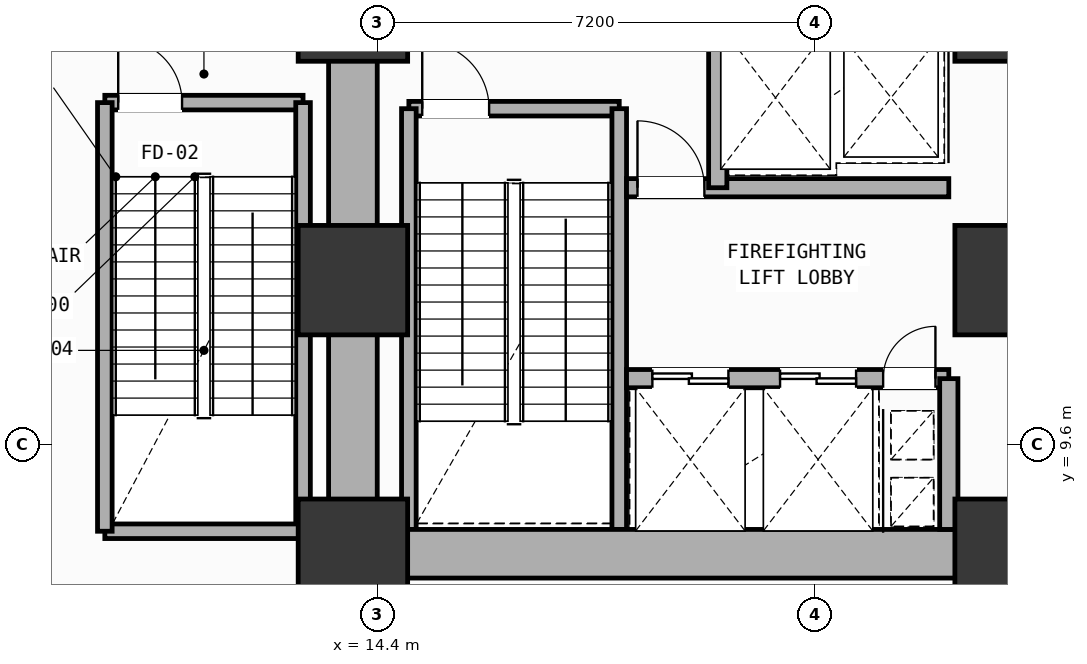
"""IFC4 building model, lengths in metres.
Left out: names, types, materials, properties, quantities, classifications, styles, units other than length and angle.
Written with IfcOpenShell. Run it as: python <this file> out.ifc"""

import sys

from ifc_helpers import new_model, si_unit, direction, frame, frame_2d, origin, origin_2d, place, context, subcontext, project, spatial, rectangle, extrude, element, fill, save


model = new_model("IFC4")
c1 = context("Model", 3, precision=1e-05, world=origin(), true_north=direction((0.0, 1.0)))
c2 = subcontext(c1, "Body", "Model", "MODEL_VIEW")
j1 = project(units=[si_unit("LENGTHUNIT", "METRE"), si_unit("PLANEANGLEUNIT", "RADIAN")], contexts=[c1])
p1 = place(None, origin())
s1 = spatial("IfcSite", under=j1, at=p1, CompositionType="ELEMENT")
p2 = place(p1, origin())
s2 = spatial("IfcBuilding", under=s1, at=p2, CompositionType="ELEMENT")
p3 = place(p2, frame((0.0, 0.0, 21.6)))
s3 = spatial("IfcBuildingStorey", under=s2, at=p3, CompositionType="ELEMENT", Elevation=21.6)
for number, where, z_axis, x_axis in (
    (1, (14.0, 7.8, 0.0), (0.0, 0.0, 1.0), (1.0, 0.0, 0.0)),
    (2, (14.0, 12.3, 0.0), (0.0, 0.0, 1.0), (1.0, 0.0, 0.0)),
    (3, (14.0, 16.8, 0.0), (0.0, 0.0, 1.0), (1.0, 0.0, 0.0)),
    (4, (24.8, 7.8, 0.0), (0.0, 0.0, 1.0), (1.0, 0.0, 0.0)),
    (5, (24.8, 12.3, 0.0), (0.0, 0.0, 1.0), (1.0, 0.0, 0.0)),
    (6, (24.8, 16.8, 0.0), (0.0, 0.0, 1.0), (1.0, 0.0, 0.0)),
):
    element("IfcColumn", number, at=place(p3, frame(where, z_axis=z_axis, x_axis=x_axis)), inside=s3, PredefinedType="COLUMN", context=c2, shape_type="SweptSolid", body=[
        extrude(rectangle(XDim=1.8, YDim=1.8, at=origin_2d()), origin(), (0.0, 0.0, 1.0), 5.4),
    ])
p4 = place(p3, frame((14.92, 15.12, 0.0), z_axis=(0.0, 0.0, 1.0), x_axis=(1.0, 0.0, 0.0)))
e7 = element("IfcWall", 7, at=p4, inside=s3, PredefinedType="SOLIDWALL", context=c2, shape_type="SweptSolid", body=[
    extrude(rectangle(XDim=3.46, YDim=0.24, at=frame_2d((1.73, 0.0))), origin(), (0.0, 0.0, 1.0), 5.1),
])
p5 = place(p4, frame((0.22, 0.0, 0.0)))
e8 = element("IfcOpeningElement", 8, at=p5, cuts=e7, PredefinedType="OPENING", context=c2, shape_type="SweptSolid", body=[
    extrude(rectangle(XDim=1.1, YDim=2.15, at=frame_2d((0.55, 1.075))), frame((0.0, 0.13, 0.0), z_axis=(0.0, -1.0, 0.0), x_axis=(1.0, 0.0, 0.0)), (0.0, 0.0, 1.0), 0.26),
])
for number, where, z_axis, x_axis in (
    (9, (18.38, 15.12, 0.0), (0.0, 0.0, 1.0), (0.0, -1.0, 0.0)),
    (10, (14.92, 8.2, 0.0), (0.0, 0.0, 1.0), (0.0, 1.0, 0.0)),
):
    element("IfcWall", number, at=place(p3, frame(where, z_axis=z_axis, x_axis=x_axis)), inside=s3, PredefinedType="SOLIDWALL", context=c2, shape_type="SweptSolid", body=[
        extrude(rectangle(XDim=6.92, YDim=0.24, at=frame_2d((3.46, 0.0))), origin(), (0.0, 0.0, 1.0), 5.1),
    ])
p6 = place(p3, frame((9.92, 15.22, 0.0), z_axis=(0.0, 0.0, 1.0), x_axis=(1.0, 0.0, 0.0)))
e11 = element("IfcWall", 11, at=p6, inside=s3, PredefinedType="SOLIDWALL", context=c2, shape_type="SweptSolid", body=[
    extrude(rectangle(XDim=3.26, YDim=0.24, at=frame_2d((1.63, 0.0))), origin(), (0.0, 0.0, 1.0), 5.1),
])
p7 = place(p6, frame((0.22, 0.0, 0.0)))
e12 = element("IfcOpeningElement", 12, at=p7, cuts=e11, PredefinedType="OPENING", context=c2, shape_type="SweptSolid", body=[
    extrude(rectangle(XDim=1.05, YDim=2.15, at=frame_2d((0.525, 1.075))), frame((0.0, 0.13, 0.0), z_axis=(0.0, -1.0, 0.0), x_axis=(1.0, 0.0, 0.0)), (0.0, 0.0, 1.0), 0.26),
])
p8 = place(p3, frame((13.18, 15.22, 0.0), z_axis=(0.0, 0.0, 1.0), x_axis=(0.0, -1.0, 0.0)))
e13 = element("IfcWall", 13, at=p8, inside=s3, PredefinedType="SOLIDWALL", context=c2, shape_type="SweptSolid", body=[
    extrude(rectangle(XDim=7.05, YDim=0.24, at=frame_2d((3.525, 0.0))), origin(), (0.0, 0.0, 1.0), 5.1),
])
p9 = place(p3, frame((13.18, 8.17, 0.0), z_axis=(0.0, 0.0, 1.0), x_axis=(-1.0, 0.0, 0.0)))
e14 = element("IfcWall", 14, at=p9, inside=s3, PredefinedType="SOLIDWALL", context=c2, shape_type="SweptSolid", body=[
    extrude(rectangle(XDim=3.26, YDim=0.24, at=frame_2d((1.63, 0.0))), origin(), (0.0, 0.0, 1.0), 5.1),
])
p10 = place(p3, frame((9.92, 8.17, 0.0), z_axis=(0.0, 0.0, 1.0), x_axis=(0.0, 1.0, 0.0)))
e15 = element("IfcWall", 15, at=p10, inside=s3, PredefinedType="SOLIDWALL", context=c2, shape_type="SweptSolid", body=[
    extrude(rectangle(XDim=7.05, YDim=0.24, at=frame_2d((3.525, 0.0))), origin(), (0.0, 0.0, 1.0), 5.1),
])
p11 = place(p3, frame((14.0, 7.8, 0.0), z_axis=(0.0, 0.0, 1.0), x_axis=(1.0, 0.0, 0.0)))
e16 = element("IfcWall", 16, at=p11, inside=s3, PredefinedType="SHEAR", context=c2, shape_type="SweptSolid", body=[
    extrude(rectangle(XDim=10.8, YDim=0.8, at=frame_2d((5.4, 0.0))), origin(), (0.0, 0.0, 1.0), 5.1),
])
p12 = place(p3, frame((14.0, 16.8, 0.0), z_axis=(0.0, 0.0, 1.0), x_axis=(0.0, -1.0, 0.0)))
e17 = element("IfcWall", 17, at=p12, inside=s3, PredefinedType="SHEAR", context=c2, shape_type="SweptSolid", body=[
    extrude(rectangle(XDim=9.0, YDim=0.8, at=frame_2d((4.5, 0.0))), origin(), (0.0, 0.0, 1.0), 5.1),
])
p13 = place(p3, frame((18.5, 10.68, 0.0), z_axis=(0.0, 0.0, 1.0), x_axis=(1.0, 0.0, 0.0)))
e18 = element("IfcWall", 18, at=p13, inside=s3, PredefinedType="SOLIDWALL", context=c2, shape_type="SweptSolid", body=[
    extrude(rectangle(XDim=5.3, YDim=0.3, at=frame_2d((2.65, 0.0))), origin(), (0.0, 0.0, 1.0), 5.1),
])
p14 = place(p13, frame((4.22, 0.0, 0.0)))
e19 = element("IfcOpeningElement", 19, at=p14, cuts=e18, PredefinedType="OPENING", context=c2, shape_type="SweptSolid", body=[
    extrude(rectangle(XDim=0.86, YDim=2.06, at=frame_2d((0.43, 1.03))), frame((0.0, 0.16, 0.0), z_axis=(0.0, -1.0, 0.0), x_axis=(1.0, 0.0, 0.0)), (0.0, 0.0, 1.0), 0.32),
])
p15 = place(p13, frame((0.425, 0.0, 0.0)))
e20 = element("IfcOpeningElement", 20, at=p15, cuts=e18, PredefinedType="OPENING", context=c2, shape_type="SweptSolid", body=[
    extrude(rectangle(XDim=1.25, YDim=2.18, at=frame_2d((0.625, 1.09))), frame((0.0, 0.16, 0.0), z_axis=(0.0, -1.0, 0.0), x_axis=(1.0, 0.0, 0.0)), (0.0, 0.0, 1.0), 0.32),
])
p16 = place(p13, frame((2.525, 0.0, 0.0)))
e21 = element("IfcOpeningElement", 21, at=p16, cuts=e18, PredefinedType="OPENING", context=c2, shape_type="SweptSolid", body=[
    extrude(rectangle(XDim=1.25, YDim=2.18, at=frame_2d((0.625, 1.09))), frame((0.0, 0.16, 0.0), z_axis=(0.0, -1.0, 0.0), x_axis=(1.0, 0.0, 0.0)), (0.0, 0.0, 1.0), 0.32),
])
p17 = place(p3, frame((18.5, 13.82, 0.0), z_axis=(0.0, 0.0, 1.0), x_axis=(1.0, 0.0, 0.0)))
e22 = element("IfcWall", 22, at=p17, inside=s3, PredefinedType="SOLIDWALL", context=c2, shape_type="SweptSolid", body=[
    extrude(rectangle(XDim=5.3, YDim=0.3, at=frame_2d((2.65, 0.0))), origin(), (0.0, 0.0, 1.0), 5.1),
])
p18 = place(p17, frame((0.18, 0.0, 0.0)))
e23 = element("IfcOpeningElement", 23, at=p18, cuts=e22, PredefinedType="OPENING", context=c2, shape_type="SweptSolid", body=[
    extrude(rectangle(XDim=1.1, YDim=2.15, at=frame_2d((0.55, 1.075))), frame((0.0, 0.16, 0.0), z_axis=(0.0, -1.0, 0.0), x_axis=(1.0, 0.0, 0.0)), (0.0, 0.0, 1.0), 0.32),
])
p19 = place(p3, frame((23.8, 8.2, 0.0), z_axis=(0.0, 0.0, 1.0), x_axis=(0.0, 1.0, 0.0)))
e24 = element("IfcWall", 24, at=p19, inside=s3, PredefinedType="SOLIDWALL", context=c2, shape_type="SweptSolid", body=[
    extrude(rectangle(XDim=2.48, YDim=0.3, at=frame_2d((1.24, 0.0))), origin(), (0.0, 0.0, 1.0), 5.1),
])
p20 = place(p3, frame((20.0, 13.82, 0.0), z_axis=(0.0, 0.0, 1.0), x_axis=(0.0, 1.0, 0.0)))
e25 = element("IfcWall", 25, at=p20, inside=s3, PredefinedType="SOLIDWALL", context=c2, shape_type="SweptSolid", body=[
    extrude(rectangle(XDim=2.73, YDim=0.3, at=frame_2d((1.365, 0.0))), origin(), (0.0, 0.0, 1.0), 5.1),
])
p21 = place(p5, origin())
e26 = element("IfcDoor", 26, at=p21, inside=s3, OperationType="SINGLE_SWING_LEFT", PredefinedType="DOOR", context=c2, shape_type="SweptSolid", body=[
    extrude(rectangle(XDim=1.1, YDim=2.15, at=frame_2d((0.55, 1.075))), frame((0.0, 0.025, 0.0), z_axis=(0.0, -1.0, 0.0), x_axis=(1.0, 0.0, 0.0)), (0.0, 0.0, 1.0), 0.05),
])
fill(e8, e26)
p22 = place(p7, origin())
e27 = element("IfcDoor", 27, at=p22, inside=s3, OperationType="SINGLE_SWING_LEFT", PredefinedType="DOOR", context=c2, shape_type="SweptSolid", body=[
    extrude(rectangle(XDim=1.05, YDim=2.15, at=frame_2d((0.525, 1.075))), frame((0.0, 0.025, 0.0), z_axis=(0.0, -1.0, 0.0), x_axis=(1.0, 0.0, 0.0)), (0.0, 0.0, 1.0), 0.05),
])
fill(e12, e27)
p23 = place(p14, origin())
e28 = element("IfcDoor", 28, at=p23, inside=s3, OperationType="SINGLE_SWING_RIGHT", PredefinedType="DOOR", context=c2, shape_type="SweptSolid", body=[
    extrude(rectangle(XDim=0.86, YDim=2.06, at=frame_2d((0.43, 1.03))), frame((0.0, 0.025, 0.0), z_axis=(0.0, -1.0, 0.0), x_axis=(1.0, 0.0, 0.0)), (0.0, 0.0, 1.0), 0.05),
])
fill(e19, e28)
p24 = place(p18, origin())
e29 = element("IfcDoor", 29, at=p24, inside=s3, OperationType="SINGLE_SWING_LEFT", PredefinedType="DOOR", context=c2, shape_type="SweptSolid", body=[
    extrude(rectangle(XDim=1.1, YDim=2.15, at=frame_2d((0.55, 1.075))), frame((0.0, 0.025, 0.0), z_axis=(0.0, -1.0, 0.0), x_axis=(1.0, 0.0, 0.0)), (0.0, 0.0, 1.0), 0.05),
])
fill(e23, e29)
p25 = place(p15, origin())
e30 = element("IfcDoor", 30, at=p25, inside=s3, OperationType="DOUBLE_DOOR_SLIDING", PredefinedType="DOOR", context=c2, shape_type="SweptSolid", body=[
    extrude(rectangle(XDim=1.25, YDim=2.18, at=frame_2d((0.625, 1.09))), frame((0.0, 0.025, 0.0), z_axis=(0.0, -1.0, 0.0), x_axis=(1.0, 0.0, 0.0)), (0.0, 0.0, 1.0), 0.05),
])
fill(e20, e30)
p26 = place(p16, origin())
e31 = element("IfcDoor", 31, at=p26, inside=s3, OperationType="DOUBLE_DOOR_SLIDING", PredefinedType="DOOR", context=c2, shape_type="SweptSolid", body=[
    extrude(rectangle(XDim=1.25, YDim=2.18, at=frame_2d((0.625, 1.09))), frame((0.0, 0.025, 0.0), z_axis=(0.0, -1.0, 0.0), x_axis=(1.0, 0.0, 0.0)), (0.0, 0.0, 1.0), 0.05),
])
fill(e21, e31)
save(model, sys.argv[1])
